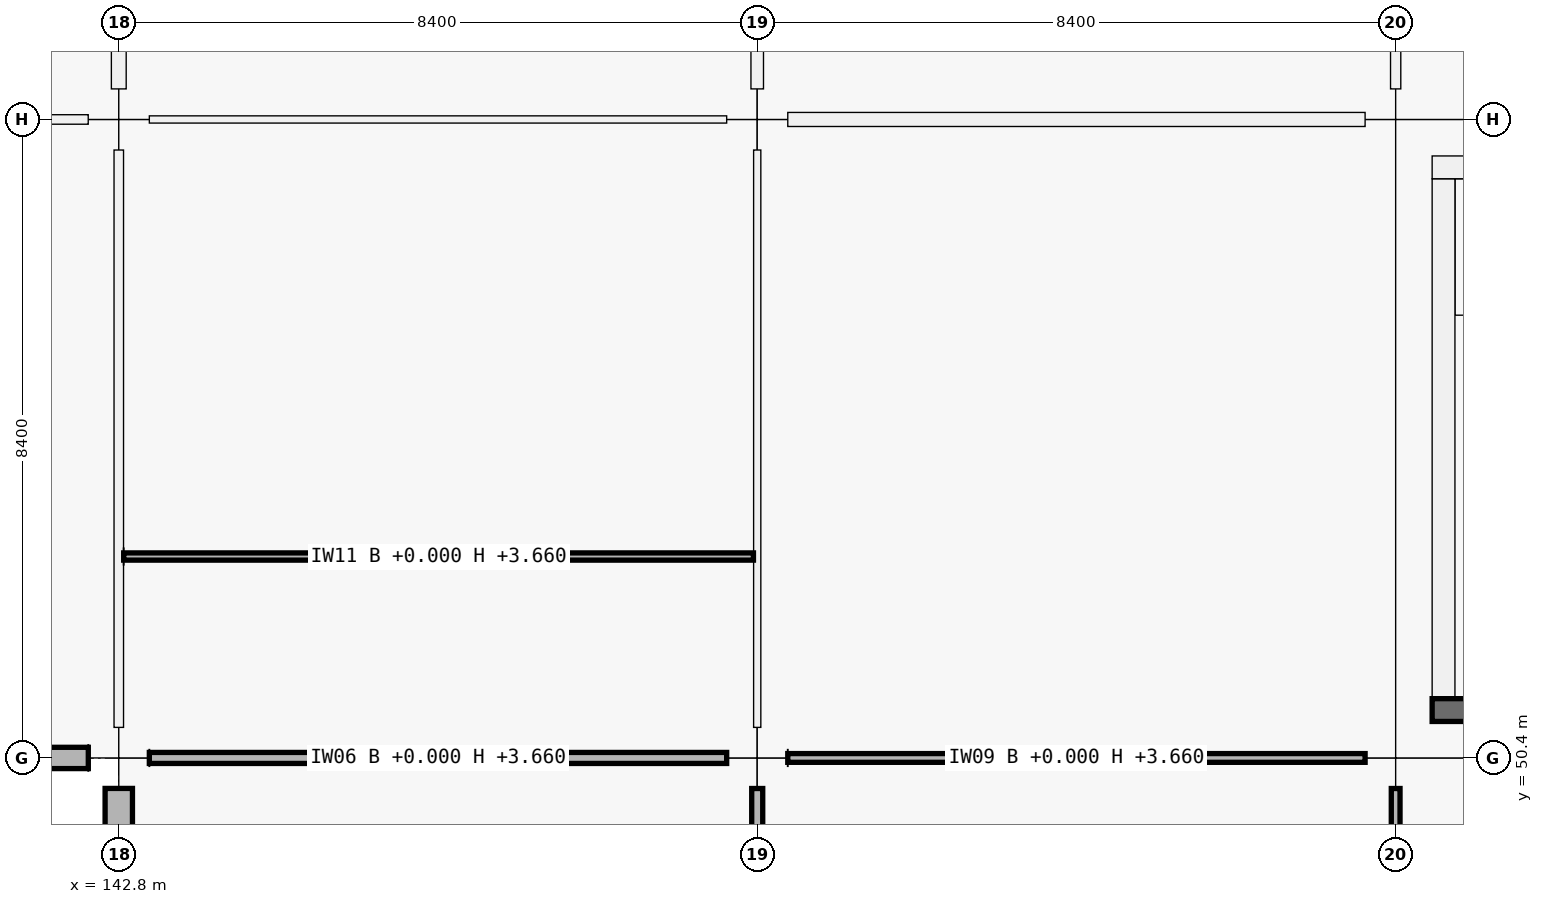
"""IFC4 building model, lengths in metres.
Left out: names, types, materials, properties, quantities, classifications, styles, units other than length and angle.
Written with IfcOpenShell. Run it as: python <this file> out.ifc"""

import sys

from ifc_helpers import new_model, si_unit, direction, frame, frame_2d, origin, origin_2d, place, context, subcontext, project, spatial, rectangle, extrude, element, fill, save


model = new_model("IFC4")
c1 = context("Model", 3, precision=1e-05, world=origin(), true_north=direction((0.0, 1.0)))
c2 = subcontext(c1, "Body", "Model", "MODEL_VIEW")
j1 = project(units=[si_unit("LENGTHUNIT", "METRE"), si_unit("PLANEANGLEUNIT", "RADIAN")], contexts=[c1])
p1 = place(None, origin())
s1 = spatial("IfcSite", under=j1, at=p1, CompositionType="ELEMENT")
p2 = place(p1, origin())
s2 = spatial("IfcBuilding", under=s1, at=p2, CompositionType="ELEMENT")
p3 = place(p2, origin())
s3 = spatial("IfcBuildingStorey", under=s2, at=p3, CompositionType="ELEMENT", Elevation=0.0)
for number, where, z_axis, x_axis in (
    (1, (142.8, 50.4, 0.0), (0.0, 0.0, 1.0), (1.0, 0.0, 0.0)),
    (2, (142.8, 58.8, 0.0), (0.0, 0.0, 1.0), (1.0, 0.0, 0.0)),
    (3, (151.2, 50.4, 0.0), (0.0, 0.0, 1.0), (1.0, 0.0, 0.0)),
    (4, (151.2, 58.8, 0.0), (0.0, 0.0, 1.0), (1.0, 0.0, 0.0)),
    (5, (159.6, 50.4, 0.0), (0.0, 0.0, 1.0), (1.0, 0.0, 0.0)),
    (6, (159.6, 58.8, 0.0), (0.0, 0.0, 1.0), (1.0, 0.0, 0.0)),
):
    element("IfcColumn", number, at=place(p3, frame(where, z_axis=z_axis, x_axis=x_axis)), inside=s3, PredefinedType="COLUMN", context=c2, shape_type="SweptSolid", body=[
        extrude(rectangle(XDim=0.8, YDim=0.8, at=origin_2d()), origin(), (0.0, 0.0, 1.0), 5.76),
    ])
p4 = place(p3, frame((142.399, 50.4, 0.0), z_axis=(0.0, 0.0, 1.0), x_axis=(-1.0, 0.0, 0.0)))
e7 = element("IfcWall", 7, at=p4, inside=s3, PredefinedType="SOLIDWALL", context=c2, shape_type="SweptSolid", body=[
    extrude(rectangle(XDim=7.598, YDim=0.28, at=frame_2d((3.799, 0.0))), origin(), (0.0, 0.0, 1.0), 4.7),
])
p5 = place(p3, frame((142.8, 42.401, 0.0), z_axis=(0.0, 0.0, 1.0), x_axis=(0.0, 1.0, 0.0)))
e8 = element("IfcWall", 8, at=p5, inside=s3, PredefinedType="SOLIDWALL", context=c2, shape_type="SweptSolid", body=[
    extrude(rectangle(XDim=7.598, YDim=0.36, at=frame_2d((3.799, 0.0))), origin(), (0.0, 0.0, 1.0), 4.7),
])
p6 = place(p5, frame((2.574, 0.0, 0.9)))
e9 = element("IfcOpeningElement", 9, at=p6, cuts=e8, PredefinedType="OPENING", context=c2, shape_type="SweptSolid", body=[
    extrude(rectangle(XDim=2.45, YDim=1.45, at=frame_2d((1.225, 0.725))), frame((0.0, 0.18, 0.0), z_axis=(0.0, -1.0, 0.0), x_axis=(1.0, 0.0, 0.0)), (0.0, 0.0, 1.0), 0.36),
])
p7 = place(p3, frame((167.52, 51.03, 0.0), z_axis=(0.0, 0.0, 1.0), x_axis=(-1.0, 0.0, 0.0)))
e10 = element("IfcWall", 10, at=p7, inside=s3, PredefinedType="SHEAR", context=c2, shape_type="SweptSolid", body=[
    extrude(rectangle(XDim=7.44, YDim=0.3, at=frame_2d((3.72, 0.0))), origin(), (0.0, 0.0, 1.0), 5.76),
])
p8 = place(p7, frame((1.28, 0.0, 0.0)))
e11 = element("IfcOpeningElement", 11, at=p8, cuts=e10, PredefinedType="OPENING", context=c2, shape_type="SweptSolid", body=[
    extrude(rectangle(XDim=1.5, YDim=2.15, at=frame_2d((0.75, 1.075))), frame((0.0, 0.15, 0.0), z_axis=(0.0, -1.0, 0.0), x_axis=(1.0, 0.0, 0.0)), (0.0, 0.0, 1.0), 0.3),
])
p9 = place(p3, frame((160.23, 51.18, 0.0), z_axis=(0.0, 0.0, 1.0), x_axis=(0.0, 1.0, 0.0)))
e12 = element("IfcWall", 12, at=p9, inside=s3, PredefinedType="SHEAR", context=c2, shape_type="SweptSolid", body=[
    extrude(rectangle(XDim=6.84, YDim=0.3, at=frame_2d((3.42, 0.0))), origin(), (0.0, 0.0, 1.0), 5.76),
])
p10 = place(p3, frame((160.08, 58.17, 0.0), z_axis=(0.0, 0.0, 1.0), x_axis=(1.0, 0.0, 0.0)))
e13 = element("IfcWall", 13, at=p10, inside=s3, PredefinedType="SHEAR", context=c2, shape_type="SweptSolid", body=[
    extrude(rectangle(XDim=7.44, YDim=0.3, at=frame_2d((3.72, 0.0))), origin(), (0.0, 0.0, 1.0), 5.76),
])
p11 = place(p3, frame((134.802, 58.8, 0.0), z_axis=(0.0, 0.0, 1.0), x_axis=(1.0, 0.0, 0.0)))
e14 = element("IfcWall", 14, at=p11, inside=s3, PredefinedType="PARTITIONING", context=c2, shape_type="SweptSolid", body=[
    extrude(rectangle(XDim=7.596, YDim=0.125, at=frame_2d((3.798, 0.0))), origin(), (0.0, 0.0, 1.0), 3.66),
])
p12 = place(p11, frame((3.293, 0.0, 0.0)))
e15 = element("IfcOpeningElement", 15, at=p12, cuts=e14, PredefinedType="OPENING", context=c2, shape_type="SweptSolid", body=[
    extrude(rectangle(XDim=1.01, YDim=2.12, at=frame_2d((0.505, 1.06))), frame((0.0, 0.062, 0.0), z_axis=(0.0, -1.0, 0.0), x_axis=(1.0, 0.0, 0.0)), (0.0, 0.0, 1.0), 0.125),
])
p13 = place(p3, frame((143.202, 50.4, 0.0), z_axis=(0.0, 0.0, 1.0), x_axis=(1.0, 0.0, 0.0)))
e16 = element("IfcWall", 16, at=p13, inside=s3, PredefinedType="PARTITIONING", context=c2, shape_type="SweptSolid", body=[
    extrude(rectangle(XDim=7.596, YDim=0.145, at=frame_2d((3.798, 0.0))), origin(), (0.0, 0.0, 1.0), 3.66),
])
p14 = place(p3, frame((143.202, 58.8, 0.0), z_axis=(0.0, 0.0, 1.0), x_axis=(1.0, 0.0, 0.0)))
e17 = element("IfcWall", 17, at=p14, inside=s3, PredefinedType="PARTITIONING", context=c2, shape_type="SweptSolid", body=[
    extrude(rectangle(XDim=7.596, YDim=0.095, at=frame_2d((3.798, 0.0))), origin(), (0.0, 0.0, 1.0), 3.66),
])
p15 = place(p3, frame((151.602, 50.4, 0.0), z_axis=(0.0, 0.0, 1.0), x_axis=(1.0, 0.0, 0.0)))
e18 = element("IfcWall", 18, at=p15, inside=s3, PredefinedType="PARTITIONING", context=c2, shape_type="SweptSolid", body=[
    extrude(rectangle(XDim=7.596, YDim=0.115, at=frame_2d((3.798, 0.0))), origin(), (0.0, 0.0, 1.0), 3.66),
])
p16 = place(p15, frame((3.308, 0.0, 0.0)))
e19 = element("IfcOpeningElement", 19, at=p16, cuts=e18, PredefinedType="OPENING", context=c2, shape_type="SweptSolid", body=[
    extrude(rectangle(XDim=0.98, YDim=2.18, at=frame_2d((0.49, 1.09))), frame((0.0, 0.058, 0.0), z_axis=(0.0, -1.0, 0.0), x_axis=(1.0, 0.0, 0.0)), (0.0, 0.0, 1.0), 0.115),
])
p17 = place(p3, frame((151.602, 58.8, 0.0), z_axis=(0.0, 0.0, 1.0), x_axis=(1.0, 0.0, 0.0)))
e20 = element("IfcWall", 20, at=p17, inside=s3, PredefinedType="PARTITIONING", context=c2, shape_type="SweptSolid", body=[
    extrude(rectangle(XDim=7.596, YDim=0.185, at=frame_2d((3.798, 0.0))), origin(), (0.0, 0.0, 1.0), 3.66),
])
p18 = place(p17, frame((3.318, 0.0, 0.0)))
e21 = element("IfcOpeningElement", 21, at=p18, cuts=e20, PredefinedType="OPENING", context=c2, shape_type="SweptSolid", body=[
    extrude(rectangle(XDim=0.96, YDim=2.18, at=frame_2d((0.48, 1.09))), frame((0.0, 0.093, 0.0), z_axis=(0.0, -1.0, 0.0), x_axis=(1.0, 0.0, 0.0)), (0.0, 0.0, 1.0), 0.185),
])
p19 = place(p3, frame((142.8, 50.802, 0.0), z_axis=(0.0, 0.0, 1.0), x_axis=(0.0, 1.0, 0.0)))
e22 = element("IfcWall", 22, at=p19, inside=s3, PredefinedType="PARTITIONING", context=c2, shape_type="SweptSolid", body=[
    extrude(rectangle(XDim=7.596, YDim=0.125, at=frame_2d((3.798, 0.0))), origin(), (0.0, 0.0, 1.0), 3.66),
])
p20 = place(p19, frame((0.593, 0.0, 0.0)))
e23 = element("IfcOpeningElement", 23, at=p20, cuts=e22, PredefinedType="OPENING", context=c2, shape_type="SweptSolid", body=[
    extrude(rectangle(XDim=0.94, YDim=2.08, at=frame_2d((0.47, 1.04))), frame((0.0, 0.062, 0.0), z_axis=(0.0, -1.0, 0.0), x_axis=(1.0, 0.0, 0.0)), (0.0, 0.0, 1.0), 0.125),
])
p21 = place(p19, frame((4.503, 0.0, 0.0)))
e24 = element("IfcOpeningElement", 24, at=p21, cuts=e22, PredefinedType="OPENING", context=c2, shape_type="SweptSolid", body=[
    extrude(rectangle(XDim=0.96, YDim=2.1, at=frame_2d((0.48, 1.05))), frame((0.0, 0.062, 0.0), z_axis=(0.0, -1.0, 0.0), x_axis=(1.0, 0.0, 0.0)), (0.0, 0.0, 1.0), 0.125),
])
p22 = place(p3, frame((142.8, 59.202, 0.0), z_axis=(0.0, 0.0, 1.0), x_axis=(0.0, 1.0, 0.0)))
e25 = element("IfcWall", 25, at=p22, inside=s3, PredefinedType="PARTITIONING", context=c2, shape_type="SweptSolid", body=[
    extrude(rectangle(XDim=7.596, YDim=0.195, at=frame_2d((3.798, 0.0))), origin(), (0.0, 0.0, 1.0), 3.66),
])
p23 = place(p22, frame((3.268, 0.0, 0.0)))
e26 = element("IfcOpeningElement", 26, at=p23, cuts=e25, PredefinedType="OPENING", context=c2, shape_type="SweptSolid", body=[
    extrude(rectangle(XDim=1.06, YDim=2.25, at=frame_2d((0.53, 1.125))), frame((0.0, 0.098, 0.0), z_axis=(0.0, -1.0, 0.0), x_axis=(1.0, 0.0, 0.0)), (0.0, 0.0, 1.0), 0.195),
])
p24 = place(p3, frame((151.2, 42.352, 0.0), z_axis=(0.0, 0.0, 1.0), x_axis=(0.0, 1.0, 0.0)))
e27 = element("IfcWall", 27, at=p24, inside=s3, PredefinedType="PARTITIONING", context=c2, shape_type="SweptSolid", body=[
    extrude(rectangle(XDim=7.646, YDim=0.145, at=frame_2d((3.823, 0.0))), origin(), (0.0, 0.0, 1.0), 3.66),
])
p25 = place(p24, frame((3.333, 0.0, 0.0)))
e28 = element("IfcOpeningElement", 28, at=p25, cuts=e27, PredefinedType="OPENING", context=c2, shape_type="SweptSolid", body=[
    extrude(rectangle(XDim=0.98, YDim=2.18, at=frame_2d((0.49, 1.09))), frame((0.0, 0.073, 0.0), z_axis=(0.0, -1.0, 0.0), x_axis=(1.0, 0.0, 0.0)), (0.0, 0.0, 1.0), 0.145),
])
p26 = place(p3, frame((151.2, 50.802, 0.0), z_axis=(0.0, 0.0, 1.0), x_axis=(0.0, 1.0, 0.0)))
e29 = element("IfcWall", 29, at=p26, inside=s3, PredefinedType="PARTITIONING", context=c2, shape_type="SweptSolid", body=[
    extrude(rectangle(XDim=7.596, YDim=0.095, at=frame_2d((3.798, 0.0))), origin(), (0.0, 0.0, 1.0), 3.66),
])
p27 = place(p3, frame((151.2, 59.202, 0.0), z_axis=(0.0, 0.0, 1.0), x_axis=(0.0, 1.0, 0.0)))
e30 = element("IfcWall", 30, at=p27, inside=s3, PredefinedType="PARTITIONING", context=c2, shape_type="SweptSolid", body=[
    extrude(rectangle(XDim=7.596, YDim=0.165, at=frame_2d((3.798, 0.0))), origin(), (0.0, 0.0, 1.0), 3.66),
])
p28 = place(p27, frame((3.318, 0.0, 0.0)))
e31 = element("IfcOpeningElement", 31, at=p28, cuts=e30, PredefinedType="OPENING", context=c2, shape_type="SweptSolid", body=[
    extrude(rectangle(XDim=0.96, YDim=2.18, at=frame_2d((0.48, 1.09))), frame((0.0, 0.083, 0.0), z_axis=(0.0, -1.0, 0.0), x_axis=(1.0, 0.0, 0.0)), (0.0, 0.0, 1.0), 0.165),
])
p29 = place(p3, frame((159.6, 42.402, 0.0), z_axis=(0.0, 0.0, 1.0), x_axis=(0.0, 1.0, 0.0)))
e32 = element("IfcWall", 32, at=p29, inside=s3, PredefinedType="PARTITIONING", context=c2, shape_type="SweptSolid", body=[
    extrude(rectangle(XDim=7.596, YDim=0.115, at=frame_2d((3.798, 0.0))), origin(), (0.0, 0.0, 1.0), 3.66),
])
p30 = place(p29, frame((3.338, 0.0, 0.0)))
e33 = element("IfcOpeningElement", 33, at=p30, cuts=e32, PredefinedType="OPENING", context=c2, shape_type="SweptSolid", body=[
    extrude(rectangle(XDim=0.92, YDim=2.15, at=frame_2d((0.46, 1.075))), frame((0.0, 0.058, 0.0), z_axis=(0.0, -1.0, 0.0), x_axis=(1.0, 0.0, 0.0)), (0.0, 0.0, 1.0), 0.115),
])
p31 = place(p3, frame((159.6, 59.202, 0.0), z_axis=(0.0, 0.0, 1.0), x_axis=(0.0, 1.0, 0.0)))
e34 = element("IfcWall", 34, at=p31, inside=s3, PredefinedType="PARTITIONING", context=c2, shape_type="SweptSolid", body=[
    extrude(rectangle(XDim=7.596, YDim=0.135, at=frame_2d((3.798, 0.0))), origin(), (0.0, 0.0, 1.0), 3.66),
])
p32 = place(p31, frame((3.288, 0.0, 0.0)))
e35 = element("IfcOpeningElement", 35, at=p32, cuts=e34, PredefinedType="OPENING", context=c2, shape_type="SweptSolid", body=[
    extrude(rectangle(XDim=1.02, YDim=2.2, at=frame_2d((0.51, 1.1))), frame((0.0, 0.067, 0.0), z_axis=(0.0, -1.0, 0.0), x_axis=(1.0, 0.0, 0.0)), (0.0, 0.0, 1.0), 0.135),
])
p33 = place(p3, frame((142.865, 53.05, 0.0), z_axis=(0.0, 0.0, 1.0), x_axis=(1.0, 0.0, 0.0)))
e36 = element("IfcWall", 36, at=p33, inside=s3, PredefinedType="PARTITIONING", context=c2, shape_type="SweptSolid", body=[
    extrude(rectangle(XDim=8.286, YDim=0.095, at=frame_2d((4.143, 0.0))), origin(), (0.0, 0.0, 1.0), 3.66),
])
p34 = place(p20, origin())
e37 = element("IfcDoor", 37, at=p34, inside=s3, OperationType="SINGLE_SWING_LEFT", PredefinedType="DOOR", context=c2, shape_type="SweptSolid", body=[
    extrude(rectangle(XDim=0.94, YDim=2.08, at=frame_2d((0.47, 1.04))), frame((0.0, 0.025, 0.0), z_axis=(0.0, -1.0, 0.0), x_axis=(1.0, 0.0, 0.0)), (0.0, 0.0, 1.0), 0.05),
])
fill(e23, e37)
p35 = place(p21, origin())
e38 = element("IfcDoor", 38, at=p35, inside=s3, OperationType="SINGLE_SWING_RIGHT", PredefinedType="DOOR", context=c2, shape_type="SweptSolid", body=[
    extrude(rectangle(XDim=0.96, YDim=2.1, at=frame_2d((0.48, 1.05))), frame((0.0, 0.025, 0.0), z_axis=(0.0, -1.0, 0.0), x_axis=(1.0, 0.0, 0.0)), (0.0, 0.0, 1.0), 0.05),
])
fill(e24, e38)
p36 = place(p16, origin())
e39 = element("IfcDoor", 39, at=p36, inside=s3, OperationType="SINGLE_SWING_RIGHT", PredefinedType="DOOR", context=c2, shape_type="SweptSolid", body=[
    extrude(rectangle(XDim=0.98, YDim=2.18, at=frame_2d((0.49, 1.09))), frame((0.0, 0.025, 0.0), z_axis=(0.0, -1.0, 0.0), x_axis=(1.0, 0.0, 0.0)), (0.0, 0.0, 1.0), 0.05),
])
fill(e19, e39)
p37 = place(p18, origin())
e40 = element("IfcDoor", 40, at=p37, inside=s3, OperationType="SINGLE_SWING_LEFT", PredefinedType="DOOR", context=c2, shape_type="SweptSolid", body=[
    extrude(rectangle(XDim=0.96, YDim=2.18, at=frame_2d((0.48, 1.09))), frame((0.0, 0.025, 0.0), z_axis=(0.0, -1.0, 0.0), x_axis=(1.0, 0.0, 0.0)), (0.0, 0.0, 1.0), 0.05),
])
fill(e21, e40)
save(model, sys.argv[1])
